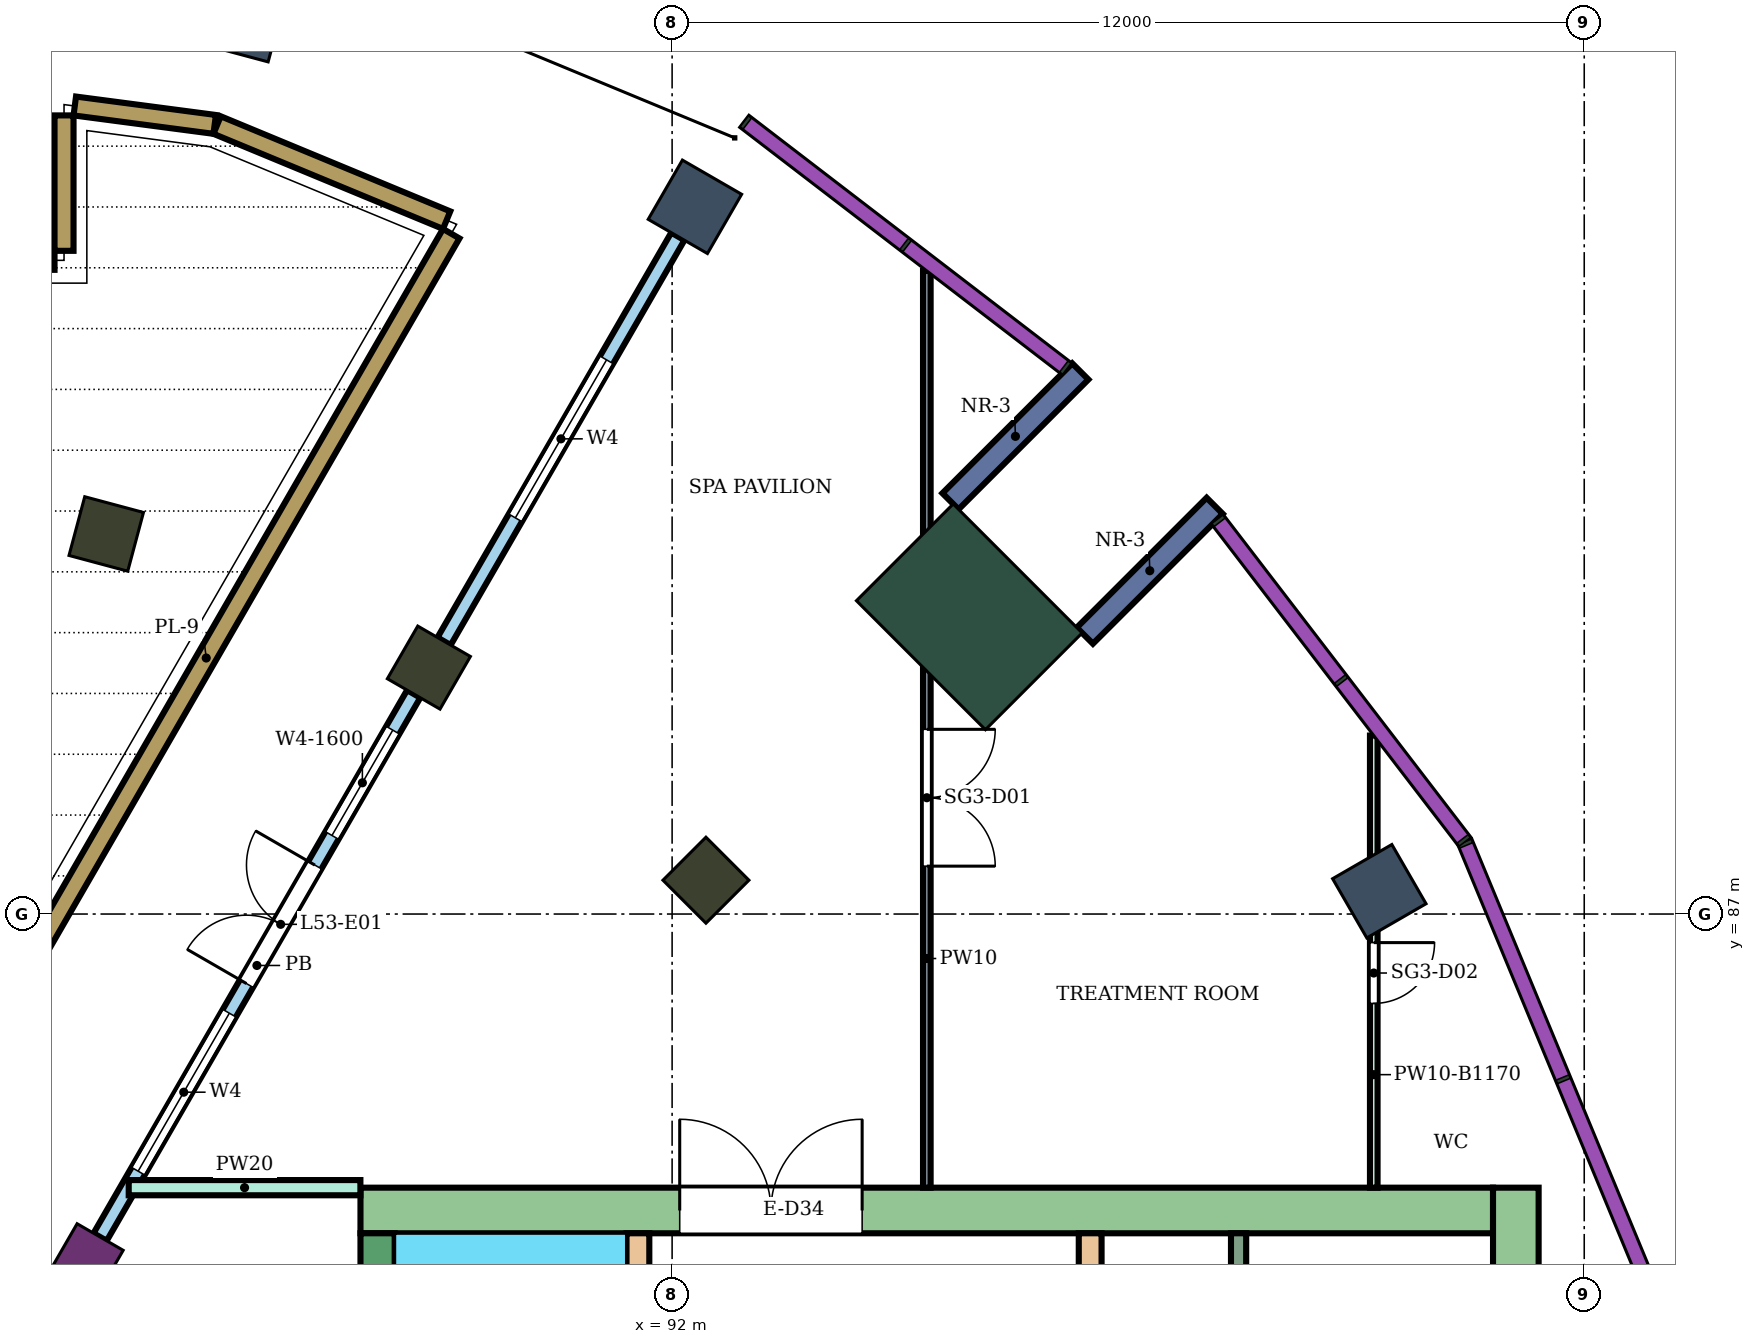
"""IFC4 building model, lengths in metres.
Left out: names, types, materials, properties, quantities, classifications, styles, units other than length and angle.
Written with IfcOpenShell. Run it as: python <this file> out.ifc"""

import sys

from ifc_helpers import new_model, si_unit, direction, frame, frame_2d, origin, origin_2d, place, context, subcontext, project, spatial, rectangle, extrude, element, fill, save


model = new_model("IFC4")
c1 = context("Model", 3, precision=1e-05, world=origin(), true_north=direction((0.0, 1.0)))
c2 = subcontext(c1, "Body", "Model", "MODEL_VIEW")
j1 = project(units=[si_unit("LENGTHUNIT", "METRE"), si_unit("PLANEANGLEUNIT", "RADIAN")], contexts=[c1])
p1 = place(None, origin())
s1 = spatial("IfcSite", under=j1, at=p1, CompositionType="ELEMENT")
p2 = place(p1, origin())
s2 = spatial("IfcBuilding", under=s1, at=p2, CompositionType="ELEMENT")
p3 = place(p2, frame((0.0, 0.0, 229.3)))
s3 = spatial("IfcBuildingStorey", under=s2, at=p3, CompositionType="ELEMENT", Elevation=229.3)
for number, where, z_axis, x_axis in (
    (1, (101.304, 87.3, 0.0), (0.0, 0.0, 1.0), (0.866, 0.5, 0.0)),
    (2, (92.3, 96.304, 0.0), (0.0, 0.0, 1.0), (0.5, 0.866, 0.0)),
    (3, (86.367, 98.762, 0.0), (0.0, 0.0, 1.0), (0.259, 0.966, 0.0)),
):
    element("IfcColumn", number, at=place(p3, frame(where, z_axis=z_axis, x_axis=x_axis)), inside=s3, PredefinedType="COLUMN", context=c2, shape_type="SweptSolid", body=[
        extrude(rectangle(XDim=0.9, YDim=0.9, at=origin_2d()), origin(), (0.0, 0.0, 1.0), 8.0),
    ])
for number, where, z_axis, x_axis in (
    (4, (92.445, 87.445, 0.0), (0.0, 0.0, 1.0), (0.707, 0.707, 0.0)),
    (5, (88.8, 90.242, 0.0), (0.0, 0.0, 1.0), (0.5, 0.866, 0.0)),
    (6, (84.555, 92.0, 0.0), (0.0, 0.0, 1.0), (0.259, 0.966, 0.0)),
):
    element("IfcColumn", number, at=place(p3, frame(where, z_axis=z_axis, x_axis=x_axis)), inside=s3, PredefinedType="COLUMN", context=c2, shape_type="SweptSolid", body=[
        extrude(rectangle(XDim=0.8, YDim=0.8, at=origin_2d()), origin(), (0.0, 0.0, 1.0), 8.0),
    ])
p4 = place(p3, frame((84.3, 82.448, 0.0), z_axis=(0.0, 0.0, 1.0), x_axis=(0.5, 0.866025403784, 0.0)))
e7 = element("IfcColumn", 7, at=p4, inside=s3, PredefinedType="COLUMN", context=c2, shape_type="SweptSolid", body=[
    extrude(rectangle(XDim=0.7, YDim=0.7, at=origin_2d()), origin(), (0.0, 0.0, 1.0), 8.0),
])
p5 = place(p3, frame((95.91, 90.91, 0.0), z_axis=(0.0, 0.0, 1.0), x_axis=(0.707106781187, 0.707106781187, 0.0)))
e8 = element("IfcColumn", 8, at=p5, inside=s3, PredefinedType="COLUMN", context=c2, shape_type="SweptSolid", body=[
    extrude(rectangle(XDim=1.8, YDim=2.4, at=origin_2d()), origin(), (0.0, 0.0, 1.0), 8.0),
])
p6 = place(p3, frame((87.9, 83.1, 0.0), z_axis=(0.0, 0.0, 1.0), x_axis=(1.0, 0.0, 0.0)))
e9 = element("IfcWall", 9, at=p6, inside=s3, PredefinedType="SHEAR", context=c2, shape_type="SweptSolid", body=[
    extrude(rectangle(XDim=14.9, YDim=0.6, at=frame_2d((7.45, 0.0))), origin(), (0.0, 0.0, 1.0), 7.68),
])
p7 = place(p6, frame((4.2, 0.0, 0.0)))
e10 = element("IfcOpeningElement", 10, at=p7, cuts=e9, PredefinedType="OPENING", context=c2, shape_type="SweptSolid", body=[
    extrude(rectangle(XDim=2.4, YDim=2.4, at=frame_2d((1.2, 1.2))), frame((0.0, 0.31, 0.0), z_axis=(0.0, -1.0, 0.0), x_axis=(1.0, 0.0, 0.0)), (0.0, 0.0, 1.0), 0.62),
])
p8 = place(p3, frame((88.125, 75.0, 0.0), z_axis=(0.0, 0.0, 1.0), x_axis=(0.0, 1.0, 0.0)))
e11 = element("IfcWall", 11, at=p8, inside=s3, PredefinedType="SHEAR", context=c2, shape_type="SweptSolid", body=[
    extrude(rectangle(XDim=7.8, YDim=0.45, at=frame_2d((3.9, 0.0))), origin(), (0.0, 0.0, 1.0), 7.68),
])
p9 = place(p3, frame((103.1, 66.6, 0.0), z_axis=(0.0, 0.0, 1.0), x_axis=(0.0, 1.0, 0.0)))
e12 = element("IfcWall", 12, at=p9, inside=s3, PredefinedType="SHEAR", context=c2, shape_type="SweptSolid", body=[
    extrude(rectangle(XDim=16.8, YDim=0.6, at=frame_2d((8.4, 0.0))), origin(), (0.0, 0.0, 1.0), 7.68),
])
p10 = place(p3, frame((91.55, 75.0, 0.0), z_axis=(0.0, 0.0, 1.0), x_axis=(0.0, 1.0, 0.0)))
e13 = element("IfcWall", 13, at=p10, inside=s3, PredefinedType="SHEAR", context=c2, shape_type="SweptSolid", body=[
    extrude(rectangle(XDim=7.8, YDim=0.3, at=frame_2d((3.9, 0.0))), origin(), (0.0, 0.0, 1.0), 7.68),
])
p11 = place(p10, frame((1.85, 0.0, 0.0)))
e14 = element("IfcOpeningElement", 14, at=p11, cuts=e13, PredefinedType="OPENING", context=c2, shape_type="SweptSolid", body=[
    extrude(rectangle(XDim=0.9, YDim=2.1, at=frame_2d((0.45, 1.05))), frame((0.0, 0.16, 0.0), z_axis=(0.0, -1.0, 0.0), x_axis=(1.0, 0.0, 0.0)), (0.0, 0.0, 1.0), 0.32),
])
p12 = place(p3, frame((97.5, 78.6, 0.0), z_axis=(0.0, 0.0, 1.0), x_axis=(0.0, 1.0, 0.0)))
e15 = element("IfcWall", 15, at=p12, inside=s3, PredefinedType="SHEAR", context=c2, shape_type="SweptSolid", body=[
    extrude(rectangle(XDim=4.2, YDim=0.3, at=frame_2d((2.1, 0.0))), origin(), (0.0, 0.0, 1.0), 7.68),
])
for number, where, z_axis, x_axis in (
    (16, (97.43, 90.662, 0.0), (0.0, 0.0, 1.0), (0.707, 0.707, 0.0)),
    (17, (95.662, 92.43, 0.0), (0.0, 0.0, 1.0), (0.707, 0.707, 0.0)),
):
    element("IfcWall", number, at=place(p3, frame(where, z_axis=z_axis, x_axis=x_axis)), inside=s3, PredefinedType="NOTDEFINED", context=c2, shape_type="SweptSolid", body=[
        extrude(rectangle(XDim=2.416, YDim=0.3, at=frame_2d((1.208, 0.0))), origin(), (0.0, 0.0, 1.0), 8.0),
    ])
p13 = place(p3, frame((82.647, 84.785, 0.0), z_axis=(0.0, 0.0, 1.0), x_axis=(0.499992370413, 0.866029808684, 0.0)))
e18 = element("IfcWall", 18, at=p13, inside=s3, PredefinedType="USERDEFINED", context=c2, shape_type="SweptSolid", body=[
    extrude(rectangle(XDim=12.893, YDim=0.25, at=frame_2d((6.446, 0.0))), origin(), (0.0, 0.0, 1.0), 0.6),
])
p14 = place(p3, frame((89.033, 96.129, 0.0), z_axis=(0.0, 0.0, 1.0), x_axis=(-0.923863886655, 0.382721202621, 0.0)))
e19 = element("IfcWall", 19, at=p14, inside=s3, PredefinedType="USERDEFINED", context=c2, shape_type="SweptSolid", body=[
    extrude(rectangle(XDim=3.269, YDim=0.25, at=frame_2d((1.634, 0.0))), origin(), (0.0, 0.0, 1.0), 0.6),
])
p15 = place(p3, frame((85.982, 97.388, 0.0), z_axis=(0.0, 0.0, 1.0), x_axis=(-0.991436829887, 0.130587182926, 0.0)))
e20 = element("IfcWall", 20, at=p15, inside=s3, PredefinedType="USERDEFINED", context=c2, shape_type="SweptSolid", body=[
    extrude(rectangle(XDim=1.856, YDim=0.25, at=frame_2d((0.928, 0.0))), origin(), (0.0, 0.0, 1.0), 0.6),
])
p16 = place(p3, frame((84.0, 97.507, 0.0), z_axis=(0.0, 0.0, 1.0), x_axis=(0.0, -1.0, 0.0)))
e21 = element("IfcWall", 21, at=p16, inside=s3, PredefinedType="USERDEFINED", context=c2, shape_type="SweptSolid", body=[
    extrude(rectangle(XDim=1.781, YDim=0.25, at=frame_2d((0.891, 0.0))), origin(), (0.0, 0.0, 1.0), 0.6),
])
p17 = place(p3, frame((83.875, 95.6, 0.0), z_axis=(0.0, 0.0, 1.0), x_axis=(-1.0, 0.0, 0.0)))
e22 = element("IfcWall", 22, at=p17, inside=s3, PredefinedType="USERDEFINED", context=c2, shape_type="SweptSolid", body=[
    extrude(rectangle(XDim=7.75, YDim=0.25, at=frame_2d((3.875, 0.0))), origin(), (0.0, 0.0, 1.0), 0.6),
])
p18 = place(p3, frame((84.475, 82.751, 0.0), z_axis=(0.0, 0.0, 1.0), x_axis=(0.499996545922, 0.866027397988, 0.0)))
e23 = element("IfcWall", 23, at=p18, inside=s3, PredefinedType="NOTDEFINED", context=c2, shape_type="SweptSolid", body=[
    extrude(rectangle(XDim=8.25, YDim=0.2, at=frame_2d((4.125, 0.0))), origin(), (0.0, 0.0, 1.0), 8.0),
])
p19 = place(p18, frame((1.0, 0.0, 0.3)))
e24 = element("IfcOpeningElement", 24, at=p19, cuts=e23, PredefinedType="OPENING", context=c2, shape_type="SweptSolid", body=[
    extrude(rectangle(XDim=2.4, YDim=3.6, at=frame_2d((1.2, 1.8))), frame((0.0, 0.11, 0.0), z_axis=(0.0, -1.0, 0.0), x_axis=(1.0, 0.0, 0.0)), (0.0, 0.0, 1.0), 0.22),
])
p20 = place(p18, frame((3.85, 0.0, 0.0)))
e25 = element("IfcOpeningElement", 25, at=p20, cuts=e23, PredefinedType="OPENING", context=c2, shape_type="SweptSolid", body=[
    extrude(rectangle(XDim=1.8, YDim=2.4, at=frame_2d((0.9, 1.2))), frame((0.0, 0.11, 0.0), z_axis=(0.0, -1.0, 0.0), x_axis=(1.0, 0.0, 0.0)), (0.0, 0.0, 1.0), 0.22),
])
p21 = place(p18, frame((6.1, 0.0, 0.3)))
e26 = element("IfcOpeningElement", 26, at=p21, cuts=e23, PredefinedType="OPENING", context=c2, shape_type="SweptSolid", body=[
    extrude(rectangle(XDim=1.6, YDim=3.6, at=frame_2d((0.8, 1.8))), frame((0.0, 0.11, 0.0), z_axis=(0.0, -1.0, 0.0), x_axis=(1.0, 0.0, 0.0)), (0.0, 0.0, 1.0), 0.22),
])
p22 = place(p3, frame((89.0, 90.588, 0.0), z_axis=(0.0, 0.0, 1.0), x_axis=(0.499985903289, 0.866033542371, 0.0)))
e27 = element("IfcWall", 27, at=p22, inside=s3, PredefinedType="NOTDEFINED", context=c2, shape_type="SweptSolid", body=[
    extrude(rectangle(XDim=6.15, YDim=0.2, at=frame_2d((3.075, 0.0))), origin(), (0.0, 0.0, 1.0), 8.0),
])
p23 = place(p22, frame((1.875, 0.0, 0.3)))
e28 = element("IfcOpeningElement", 28, at=p23, cuts=e27, PredefinedType="OPENING", context=c2, shape_type="SweptSolid", body=[
    extrude(rectangle(XDim=2.4, YDim=3.6, at=frame_2d((1.2, 1.8))), frame((0.0, 0.11, 0.0), z_axis=(0.0, -1.0, 0.0), x_axis=(1.0, 0.0, 0.0)), (0.0, 0.0, 1.0), 0.22),
])
p24 = place(p3, frame((84.851, 83.4, 0.0), z_axis=(0.0, 0.0, 1.0), x_axis=(1.0, 0.0, 0.0)))
e29 = element("IfcWall", 29, at=p24, inside=s3, PredefinedType="PARTITIONING", context=c2, shape_type="SweptSolid", body=[
    extrude(rectangle(XDim=3.048, YDim=0.2, at=frame_2d((1.524, 0.0))), origin(), (0.0, 0.0, 1.0), 7.55),
])
p25 = place(p3, frame((95.351, 83.4, 0.0), z_axis=(0.0, 0.0, 1.0), x_axis=(0.0, 1.0, 0.0)))
e30 = element("IfcWall", 30, at=p25, inside=s3, PredefinedType="PARTITIONING", context=c2, shape_type="SweptSolid", body=[
    extrude(rectangle(XDim=12.06, YDim=0.1, at=frame_2d((6.03, 0.0))), origin(), (0.0, 0.0, 1.0), 7.55),
])
p26 = place(p25, frame((4.23, 0.0, 0.0)))
e31 = element("IfcOpeningElement", 31, at=p26, cuts=e30, PredefinedType="OPENING", context=c2, shape_type="SweptSolid", body=[
    extrude(rectangle(XDim=1.8, YDim=2.1, at=frame_2d((0.9, 1.05))), frame((0.0, 0.06, 0.0), z_axis=(0.0, -1.0, 0.0), x_axis=(1.0, 0.0, 0.0)), (0.0, 0.0, 1.0), 0.12),
])
p27 = place(p3, frame((101.231, 83.4, 0.0), z_axis=(0.0, 0.0, 1.0), x_axis=(0.0, 1.0, 0.0)))
e32 = element("IfcWall", 32, at=p27, inside=s3, PredefinedType="PARTITIONING", context=c2, shape_type="SweptSolid", body=[
    extrude(rectangle(XDim=5.948, YDim=0.1, at=frame_2d((2.974, 0.0))), origin(), (0.0, 0.0, 1.0), 6.83),
])
p28 = place(p27, frame((2.424, 0.0, 0.0)))
e33 = element("IfcOpeningElement", 33, at=p28, cuts=e32, PredefinedType="OPENING", context=c2, shape_type="SweptSolid", body=[
    extrude(rectangle(XDim=0.8, YDim=2.1, at=frame_2d((0.4, 1.05))), frame((0.0, 0.06, 0.0), z_axis=(0.0, -1.0, 0.0), x_axis=(1.0, 0.0, 0.0)), (0.0, 0.0, 1.0), 0.12),
])
p29 = place(p3, frame((99.452, 78.9, 0.0), z_axis=(0.0, 0.0, 1.0), x_axis=(0.0, 1.0, 0.0)))
e34 = element("IfcWall", 34, at=p29, inside=s3, PredefinedType="PARTITIONING", context=c2, shape_type="SweptSolid", body=[
    extrude(rectangle(XDim=3.9, YDim=0.2, at=frame_2d((1.95, 0.0))), origin(), (0.0, 0.0, 1.0), 7.68),
])
p30 = place(p19, origin())
e35 = element("IfcWindow", 35, at=p30, inside=s3, PartitioningType="SINGLE_PANEL", PredefinedType="WINDOW", context=c2, shape_type="SweptSolid", body=[
    extrude(rectangle(XDim=2.4, YDim=3.6, at=frame_2d((1.2, 1.8))), frame((0.0, 0.03, 0.0), z_axis=(0.0, -1.0, 0.0), x_axis=(1.0, 0.0, 0.0)), (0.0, 0.0, 1.0), 0.06),
])
fill(e24, e35)
p31 = place(p20, origin())
e36 = element("IfcDoor", 36, at=p31, inside=s3, OperationType="DOUBLE_DOOR_SINGLE_SWING", PredefinedType="DOOR", context=c2, shape_type="SweptSolid", body=[
    extrude(rectangle(XDim=1.8, YDim=2.4, at=frame_2d((0.9, 1.2))), frame((0.0, 0.025, 0.0), z_axis=(0.0, -1.0, 0.0), x_axis=(1.0, 0.0, 0.0)), (0.0, 0.0, 1.0), 0.05),
])
fill(e25, e36)
p32 = place(p21, origin())
e37 = element("IfcWindow", 37, at=p32, inside=s3, PartitioningType="SINGLE_PANEL", PredefinedType="WINDOW", context=c2, shape_type="SweptSolid", body=[
    extrude(rectangle(XDim=1.6, YDim=3.6, at=frame_2d((0.8, 1.8))), frame((0.0, 0.03, 0.0), z_axis=(0.0, -1.0, 0.0), x_axis=(1.0, 0.0, 0.0)), (0.0, 0.0, 1.0), 0.06),
])
fill(e26, e37)
p33 = place(p23, origin())
e38 = element("IfcWindow", 38, at=p33, inside=s3, PartitioningType="SINGLE_PANEL", PredefinedType="WINDOW", context=c2, shape_type="SweptSolid", body=[
    extrude(rectangle(XDim=2.4, YDim=3.6, at=frame_2d((1.2, 1.8))), frame((0.0, 0.03, 0.0), z_axis=(0.0, -1.0, 0.0), x_axis=(1.0, 0.0, 0.0)), (0.0, 0.0, 1.0), 0.06),
])
fill(e28, e38)
p34 = place(p26, frame((1.8, 0.0, 0.0), z_axis=(0.0, 0.0, 1.0), x_axis=(-1.0, 0.0, 0.0)))
e39 = element("IfcDoor", 39, at=p34, inside=s3, OperationType="DOUBLE_DOOR_SINGLE_SWING", PredefinedType="DOOR", context=c2, shape_type="SweptSolid", body=[
    extrude(rectangle(XDim=1.8, YDim=2.1, at=frame_2d((0.9, 1.05))), frame((0.0, 0.025, 0.0), z_axis=(0.0, -1.0, 0.0), x_axis=(1.0, 0.0, 0.0)), (0.0, 0.0, 1.0), 0.05),
])
fill(e31, e39)
p35 = place(p28, frame((0.8, 0.0, 0.0), z_axis=(0.0, 0.0, 1.0), x_axis=(-1.0, 0.0, 0.0)))
e40 = element("IfcDoor", 40, at=p35, inside=s3, OperationType="SINGLE_SWING_LEFT", PredefinedType="DOOR", context=c2, shape_type="SweptSolid", body=[
    extrude(rectangle(XDim=0.8, YDim=2.1, at=frame_2d((0.4, 1.05))), frame((0.0, 0.025, 0.0), z_axis=(0.0, -1.0, 0.0), x_axis=(1.0, 0.0, 0.0)), (0.0, 0.0, 1.0), 0.05),
])
fill(e33, e40)
p36 = place(p7, origin())
e41 = element("IfcDoor", 41, at=p36, inside=s3, OperationType="DOUBLE_DOOR_SINGLE_SWING", PredefinedType="DOOR", context=c2, shape_type="SweptSolid", body=[
    extrude(rectangle(XDim=2.4, YDim=2.4, at=frame_2d((1.2, 1.2))), frame((0.0, 0.025, 0.0), z_axis=(0.0, -1.0, 0.0), x_axis=(1.0, 0.0, 0.0)), (0.0, 0.0, 1.0), 0.05),
])
fill(e10, e41)
save(model, sys.argv[1])
